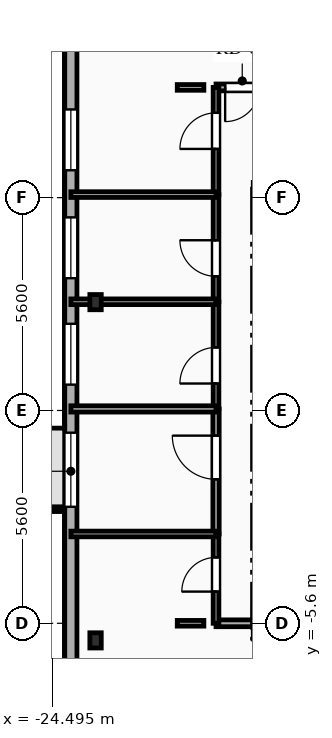
"""IFC4 building model, lengths in metres.
Left out: names, types, materials, properties, quantities, classifications, styles, units other than length and angle.
Written with IfcOpenShell. Run it as: python <this file> out.ifc"""

import sys

from ifc_helpers import new_model, si_unit, direction, frame, frame_2d, origin, origin_2d, place, context, subcontext, project, spatial, rectangle, i_section, extrude, element, fill, save


model = new_model("IFC4")
c1 = context("Model", 3, precision=1e-05, world=origin(), true_north=direction((0.0, 1.0)))
c2 = subcontext(c1, "Body", "Model", "MODEL_VIEW")
j1 = project(units=[si_unit("LENGTHUNIT", "METRE"), si_unit("PLANEANGLEUNIT", "RADIAN")], contexts=[c1])
p1 = place(None, origin())
s1 = spatial("IfcSite", under=j1, at=p1, CompositionType="ELEMENT")
p2 = place(p1, origin())
s2 = spatial("IfcBuilding", under=s1, at=p2, CompositionType="ELEMENT")
p3 = place(p2, frame((0.0, 0.0, 245.05)))
s3 = spatial("IfcBuildingStorey", under=s2, at=p3, CompositionType="ELEMENT", Elevation=245.05)
for number, where, z_axis, x_axis in (
    (1, (-23.35, 2.85, 0.0), (0.0, 0.0, 1.0), (1.0, 0.0, 0.0)),
    (2, (-23.35, -6.05, 0.0), (0.0, 0.0, 1.0), (1.0, 0.0, 0.0)),
):
    element("IfcColumn", number, at=place(p3, frame(where, z_axis=z_axis, x_axis=x_axis)), inside=s3, PredefinedType="COLUMN", context=c2, shape_type="SweptSolid", body=[
        extrude(i_section(OverallWidth=0.3, OverallDepth=0.4, WebThickness=0.013, FlangeThickness=0.024, FilletRadius=0.027, at=origin_2d()), origin(), (0.0, 0.0, 1.0), 3.35),
    ])
p4 = place(p3, frame((-24.0, -15.6, 0.0), z_axis=(0.0, 0.0, 1.0), x_axis=(0.0, 1.0, 0.0)))
e3 = element("IfcWall", 3, at=p4, inside=s3, PredefinedType="SOLIDWALL", context=c2, shape_type="SweptSolid", body=[
    extrude(rectangle(XDim=28.0, YDim=0.32, at=frame_2d((14.0, 0.0))), origin(), (0.0, 0.0, 1.0), 3.04),
])
p5 = place(p4, frame((13.065, 0.0, 0.85)))
e4 = element("IfcOpeningElement", 4, at=p5, cuts=e3, PredefinedType="OPENING", context=c2, shape_type="SweptSolid", body=[
    extrude(rectangle(XDim=1.95, YDim=1.85, at=frame_2d((0.975, 0.925))), frame((0.0, 0.17, 0.0), z_axis=(0.0, -1.0, 0.0), x_axis=(1.0, 0.0, 0.0)), (0.0, 0.0, 1.0), 0.34),
])
p6 = place(p4, frame((16.28, 0.0, 0.85)))
e5 = element("IfcOpeningElement", 5, at=p6, cuts=e3, PredefinedType="OPENING", context=c2, shape_type="SweptSolid", body=[
    extrude(rectangle(XDim=1.6, YDim=1.85, at=frame_2d((0.8, 0.925))), frame((0.0, 0.17, 0.0), z_axis=(0.0, -1.0, 0.0), x_axis=(1.0, 0.0, 0.0)), (0.0, 0.0, 1.0), 0.34),
])
p7 = place(p4, frame((19.08, 0.0, 0.85)))
e6 = element("IfcOpeningElement", 6, at=p7, cuts=e3, PredefinedType="OPENING", context=c2, shape_type="SweptSolid", body=[
    extrude(rectangle(XDim=1.6, YDim=1.85, at=frame_2d((0.8, 0.925))), frame((0.0, 0.17, 0.0), z_axis=(0.0, -1.0, 0.0), x_axis=(1.0, 0.0, 0.0)), (0.0, 0.0, 1.0), 0.34),
])
p8 = place(p4, frame((21.92, 0.0, 0.85)))
e7 = element("IfcOpeningElement", 7, at=p8, cuts=e3, PredefinedType="OPENING", context=c2, shape_type="SweptSolid", body=[
    extrude(rectangle(XDim=1.6, YDim=1.85, at=frame_2d((0.8, 0.925))), frame((0.0, 0.17, 0.0), z_axis=(0.0, -1.0, 0.0), x_axis=(1.0, 0.0, 0.0)), (0.0, 0.0, 1.0), 0.34),
])
p9 = place(p3, frame((-18.8, 8.5, 0.0), z_axis=(0.0, 0.0, 1.0), x_axis=(-1.0, 0.0, 0.0)))
e8 = element("IfcWall", 8, at=p9, inside=s3, PredefinedType="PARTITIONING", context=c2, shape_type="SweptSolid", body=[
    extrude(rectangle(XDim=1.38, YDim=0.18, at=frame_2d((0.69, 0.0))), origin(), (0.0, 0.0, 1.0), 3.04),
])
p10 = place(p9, frame((0.24, 0.0, 0.0)))
e9 = element("IfcOpeningElement", 9, at=p10, cuts=e8, PredefinedType="OPENING", context=c2, shape_type="SweptSolid", body=[
    extrude(rectangle(XDim=0.9, YDim=2.1, at=frame_2d((0.45, 1.05))), frame((0.0, 0.1, 0.0), z_axis=(0.0, -1.0, 0.0), x_axis=(1.0, 0.0, 0.0)), (0.0, 0.0, 1.0), 0.2),
])
p11 = place(p3, frame((-20.5, 8.5, 0.0), z_axis=(0.0, 0.0, 1.0), x_axis=(-1.0, 0.0, 0.0)))
e10 = element("IfcWall", 10, at=p11, inside=s3, PredefinedType="PARTITIONING", context=c2, shape_type="SweptSolid", body=[
    extrude(rectangle(XDim=0.7, YDim=0.15, at=frame_2d((0.35, 0.0))), origin(), (0.0, 0.0, 1.0), 3.04),
])
p12 = place(p3, frame((-20.18, -5.6, 0.0), z_axis=(0.0, 0.0, 1.0), x_axis=(1.0, 0.0, 0.0)))
e11 = element("IfcWall", 11, at=p12, inside=s3, PredefinedType="PARTITIONING", context=c2, shape_type="SweptSolid", body=[
    extrude(rectangle(XDim=1.38, YDim=0.18, at=frame_2d((0.69, 0.0))), origin(), (0.0, 0.0, 1.0), 3.04),
])
p13 = place(p3, frame((-21.2, -5.6, 0.0), z_axis=(0.0, 0.0, 1.0), x_axis=(1.0, 0.0, 0.0)))
e12 = element("IfcWall", 12, at=p13, inside=s3, PredefinedType="PLUMBINGWALL", context=c2, shape_type="SweptSolid", body=[
    extrude(rectangle(XDim=0.7, YDim=0.15, at=frame_2d((0.35, 0.0))), origin(), (0.0, 0.0, 1.0), 3.04),
])
p14 = place(p3, frame((-20.18, -5.6, 0.0), z_axis=(0.0, 0.0, 1.0), x_axis=(0.0, 1.0, 0.0)))
e13 = element("IfcWall", 13, at=p14, inside=s3, PredefinedType="PLUMBINGWALL", context=c2, shape_type="SweptSolid", body=[
    extrude(rectangle(XDim=2.35, YDim=0.15, at=frame_2d((1.175, 0.0))), origin(), (0.0, 0.0, 1.0), 3.04),
])
p15 = place(p14, frame((0.834, 0.0, 0.0)))
e14 = element("IfcOpeningElement", 14, at=p15, cuts=e13, PredefinedType="OPENING", context=c2, shape_type="SweptSolid", body=[
    extrude(rectangle(XDim=0.9, YDim=2.1, at=frame_2d((0.45, 1.05))), frame((0.0, 0.085, 0.0), z_axis=(0.0, -1.0, 0.0), x_axis=(1.0, 0.0, 0.0)), (0.0, 0.0, 1.0), 0.17),
])
p16 = place(p3, frame((-20.18, -3.25, 0.0), z_axis=(0.0, 0.0, 1.0), x_axis=(0.0, 1.0, 0.0)))
e15 = element("IfcWall", 15, at=p16, inside=s3, PredefinedType="PARTITIONING", context=c2, shape_type="SweptSolid", body=[
    extrude(rectangle(XDim=3.29, YDim=0.165, at=frame_2d((1.645, 0.0))), origin(), (0.0, 0.0, 1.0), 3.04),
])
p17 = place(p16, frame((1.438, 0.0, 0.0)))
e16 = element("IfcOpeningElement", 16, at=p17, cuts=e15, PredefinedType="OPENING", context=c2, shape_type="SweptSolid", body=[
    extrude(rectangle(XDim=1.15, YDim=2.15, at=frame_2d((0.575, 1.075))), frame((0.0, 0.093, 0.0), z_axis=(0.0, -1.0, 0.0), x_axis=(1.0, 0.0, 0.0)), (0.0, 0.0, 1.0), 0.185),
])
p18 = place(p3, frame((-20.18, 0.04, 0.0), z_axis=(0.0, 0.0, 1.0), x_axis=(0.0, 1.0, 0.0)))
e17 = element("IfcWall", 17, at=p18, inside=s3, PredefinedType="PARTITIONING", context=c2, shape_type="SweptSolid", body=[
    extrude(rectangle(XDim=2.82, YDim=0.15, at=frame_2d((1.41, 0.0))), origin(), (0.0, 0.0, 1.0), 3.04),
])
p19 = place(p18, frame((0.669, 0.0, 0.0)))
e18 = element("IfcOpeningElement", 18, at=p19, cuts=e17, PredefinedType="OPENING", context=c2, shape_type="SweptSolid", body=[
    extrude(rectangle(XDim=0.95, YDim=2.1, at=frame_2d((0.475, 1.05))), frame((0.0, 0.085, 0.0), z_axis=(0.0, -1.0, 0.0), x_axis=(1.0, 0.0, 0.0)), (0.0, 0.0, 1.0), 0.17),
])
p20 = place(p3, frame((-20.18, 2.86, 0.0), z_axis=(0.0, 0.0, 1.0), x_axis=(0.0, 1.0, 0.0)))
e19 = element("IfcWall", 19, at=p20, inside=s3, PredefinedType="PARTITIONING", context=c2, shape_type="SweptSolid", body=[
    extrude(rectangle(XDim=2.82, YDim=0.15, at=frame_2d((1.41, 0.0))), origin(), (0.0, 0.0, 1.0), 3.04),
])
p21 = place(p20, frame((0.669, 0.0, 0.0)))
e20 = element("IfcOpeningElement", 20, at=p21, cuts=e19, PredefinedType="OPENING", context=c2, shape_type="SweptSolid", body=[
    extrude(rectangle(XDim=0.95, YDim=2.1, at=frame_2d((0.475, 1.05))), frame((0.0, 0.085, 0.0), z_axis=(0.0, -1.0, 0.0), x_axis=(1.0, 0.0, 0.0)), (0.0, 0.0, 1.0), 0.17),
])
p22 = place(p3, frame((-20.18, 5.68, 0.0), z_axis=(0.0, 0.0, 1.0), x_axis=(0.0, 1.0, 0.0)))
e21 = element("IfcWall", 21, at=p22, inside=s3, PredefinedType="PARTITIONING", context=c2, shape_type="SweptSolid", body=[
    extrude(rectangle(XDim=2.82, YDim=0.15, at=frame_2d((1.41, 0.0))), origin(), (0.0, 0.0, 1.0), 3.04),
])
p23 = place(p22, frame((1.201, 0.0, 0.0)))
e22 = element("IfcOpeningElement", 22, at=p23, cuts=e21, PredefinedType="OPENING", context=c2, shape_type="SweptSolid", body=[
    extrude(rectangle(XDim=0.95, YDim=2.1, at=frame_2d((0.475, 1.05))), frame((0.0, 0.085, 0.0), z_axis=(0.0, -1.0, 0.0), x_axis=(1.0, 0.0, 0.0)), (0.0, 0.0, 1.0), 0.17),
])
p24 = place(p3, frame((-24.0, -3.25, 0.0), z_axis=(0.0, 0.0, 1.0), x_axis=(1.0, 0.0, 0.0)))
e23 = element("IfcWall", 23, at=p24, inside=s3, PredefinedType="PLUMBINGWALL", context=c2, shape_type="SweptSolid", body=[
    extrude(rectangle(XDim=3.82, YDim=0.15, at=frame_2d((1.91, 0.0))), origin(), (0.0, 0.0, 1.0), 3.04),
])
p25 = place(p3, frame((-24.0, 0.04, 0.0), z_axis=(0.0, 0.0, 1.0), x_axis=(1.0, 0.0, 0.0)))
e24 = element("IfcWall", 24, at=p25, inside=s3, PredefinedType="PARTITIONING", context=c2, shape_type="SweptSolid", body=[
    extrude(rectangle(XDim=3.82, YDim=0.165, at=frame_2d((1.91, 0.0))), origin(), (0.0, 0.0, 1.0), 3.04),
])
p26 = place(p3, frame((-24.0, 2.86, 0.0), z_axis=(0.0, 0.0, 1.0), x_axis=(1.0, 0.0, 0.0)))
e25 = element("IfcWall", 25, at=p26, inside=s3, PredefinedType="PARTITIONING", context=c2, shape_type="SweptSolid", body=[
    extrude(rectangle(XDim=3.82, YDim=0.15, at=frame_2d((1.91, 0.0))), origin(), (0.0, 0.0, 1.0), 2.665),
])
p27 = place(p3, frame((-24.0, 5.68, 0.0), z_axis=(0.0, 0.0, 1.0), x_axis=(1.0, 0.0, 0.0)))
e26 = element("IfcWall", 26, at=p27, inside=s3, PredefinedType="PARTITIONING", context=c2, shape_type="SweptSolid", body=[
    extrude(rectangle(XDim=3.82, YDim=0.15, at=frame_2d((1.91, 0.0))), origin(), (0.0, 0.0, 1.0), 3.04),
])
p28 = place(p5, origin())
e27 = element("IfcWindow", 27, at=p28, inside=s3, PartitioningType="SINGLE_PANEL", PredefinedType="WINDOW", context=c2, shape_type="SweptSolid", body=[
    extrude(rectangle(XDim=1.95, YDim=1.85, at=frame_2d((0.975, 0.925))), frame((0.0, 0.03, 0.0), z_axis=(0.0, -1.0, 0.0), x_axis=(1.0, 0.0, 0.0)), (0.0, 0.0, 1.0), 0.06),
])
fill(e4, e27)
p29 = place(p6, origin())
e28 = element("IfcWindow", 28, at=p29, inside=s3, PartitioningType="SINGLE_PANEL", PredefinedType="WINDOW", context=c2, shape_type="SweptSolid", body=[
    extrude(rectangle(XDim=1.6, YDim=1.85, at=frame_2d((0.8, 0.925))), frame((0.0, 0.03, 0.0), z_axis=(0.0, -1.0, 0.0), x_axis=(1.0, 0.0, 0.0)), (0.0, 0.0, 1.0), 0.06),
])
fill(e5, e28)
p30 = place(p7, origin())
e29 = element("IfcWindow", 29, at=p30, inside=s3, PartitioningType="SINGLE_PANEL", PredefinedType="WINDOW", context=c2, shape_type="SweptSolid", body=[
    extrude(rectangle(XDim=1.6, YDim=1.85, at=frame_2d((0.8, 0.925))), frame((0.0, 0.03, 0.0), z_axis=(0.0, -1.0, 0.0), x_axis=(1.0, 0.0, 0.0)), (0.0, 0.0, 1.0), 0.06),
])
fill(e6, e29)
p31 = place(p8, origin())
e30 = element("IfcWindow", 30, at=p31, inside=s3, PartitioningType="SINGLE_PANEL", PredefinedType="WINDOW", context=c2, shape_type="SweptSolid", body=[
    extrude(rectangle(XDim=1.6, YDim=1.85, at=frame_2d((0.8, 0.925))), frame((0.0, 0.03, 0.0), z_axis=(0.0, -1.0, 0.0), x_axis=(1.0, 0.0, 0.0)), (0.0, 0.0, 1.0), 0.06),
])
fill(e7, e30)
p32 = place(p10, origin())
e31 = element("IfcDoor", 31, at=p32, inside=s3, OperationType="SINGLE_SWING_RIGHT", PredefinedType="DOOR", context=c2, shape_type="SweptSolid", body=[
    extrude(rectangle(XDim=0.9, YDim=2.1, at=frame_2d((0.45, 1.05))), frame((0.0, 0.025, 0.0), z_axis=(0.0, -1.0, 0.0), x_axis=(1.0, 0.0, 0.0)), (0.0, 0.0, 1.0), 0.05),
])
fill(e9, e31)
p33 = place(p15, origin())
e32 = element("IfcDoor", 32, at=p33, inside=s3, OperationType="SINGLE_SWING_LEFT", PredefinedType="DOOR", context=c2, shape_type="SweptSolid", body=[
    extrude(rectangle(XDim=0.9, YDim=2.1, at=frame_2d((0.45, 1.05))), frame((0.0, 0.025, 0.0), z_axis=(0.0, -1.0, 0.0), x_axis=(1.0, 0.0, 0.0)), (0.0, 0.0, 1.0), 0.05),
])
fill(e14, e32)
p34 = place(p17, origin())
e33 = element("IfcDoor", 33, at=p34, inside=s3, OperationType="SINGLE_SWING_RIGHT", PredefinedType="DOOR", context=c2, shape_type="SweptSolid", body=[
    extrude(rectangle(XDim=1.15, YDim=2.15, at=frame_2d((0.575, 1.075))), frame((0.0, 0.025, 0.0), z_axis=(0.0, -1.0, 0.0), x_axis=(1.0, 0.0, 0.0)), (0.0, 0.0, 1.0), 0.05),
])
fill(e16, e33)
p35 = place(p19, origin())
e34 = element("IfcDoor", 34, at=p35, inside=s3, OperationType="SINGLE_SWING_LEFT", PredefinedType="DOOR", context=c2, shape_type="SweptSolid", body=[
    extrude(rectangle(XDim=0.95, YDim=2.1, at=frame_2d((0.475, 1.05))), frame((0.0, 0.025, 0.0), z_axis=(0.0, -1.0, 0.0), x_axis=(1.0, 0.0, 0.0)), (0.0, 0.0, 1.0), 0.05),
])
fill(e18, e34)
p36 = place(p21, origin())
e35 = element("IfcDoor", 35, at=p36, inside=s3, OperationType="SINGLE_SWING_RIGHT", PredefinedType="DOOR", context=c2, shape_type="SweptSolid", body=[
    extrude(rectangle(XDim=0.95, YDim=2.1, at=frame_2d((0.475, 1.05))), frame((0.0, 0.025, 0.0), z_axis=(0.0, -1.0, 0.0), x_axis=(1.0, 0.0, 0.0)), (0.0, 0.0, 1.0), 0.05),
])
fill(e20, e35)
p37 = place(p23, origin())
e36 = element("IfcDoor", 36, at=p37, inside=s3, OperationType="SINGLE_SWING_LEFT", PredefinedType="DOOR", context=c2, shape_type="SweptSolid", body=[
    extrude(rectangle(XDim=0.95, YDim=2.1, at=frame_2d((0.475, 1.05))), frame((0.0, 0.025, 0.0), z_axis=(0.0, -1.0, 0.0), x_axis=(1.0, 0.0, 0.0)), (0.0, 0.0, 1.0), 0.05),
])
fill(e22, e36)
save(model, sys.argv[1])
